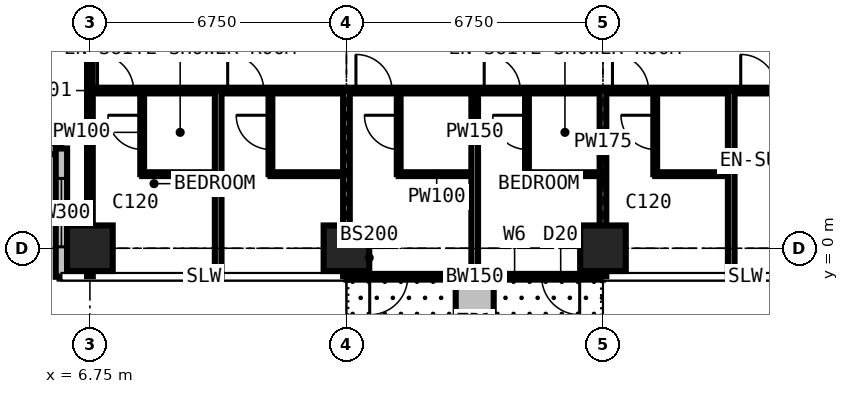
"""IFC4 building model, lengths in metres.
Left out: names, types, materials, properties, quantities, classifications, styles, units other than length and angle.
Written with IfcOpenShell. Run it as: python <this file> out.ifc"""

import sys

from ifc_helpers import new_model, si_unit, direction, frame, frame_2d, origin, origin_2d, place, context, subcontext, project, spatial, rectangle, extrude, element, fill, save


model = new_model("IFC4")
c1 = context("Model", 3, precision=1e-05, world=origin(), true_north=direction((0.0, 1.0)))
c2 = subcontext(c1, "Body", "Model", "MODEL_VIEW")
j1 = project(units=[si_unit("LENGTHUNIT", "METRE"), si_unit("PLANEANGLEUNIT", "RADIAN")], contexts=[c1])
p1 = place(None, origin())
s1 = spatial("IfcSite", under=j1, at=p1, CompositionType="ELEMENT")
p2 = place(p1, origin())
s2 = spatial("IfcBuilding", under=s1, at=p2, CompositionType="ELEMENT")
p3 = place(p2, frame((0.0, 0.0, 171.0)))
s3 = spatial("IfcBuildingStorey", under=s2, at=p3, CompositionType="ELEMENT", Elevation=171.0)
for number, where, z_axis, x_axis in (
    (1, (6.75, 0.0, 0.0), (0.0, 0.0, 1.0), (1.0, 0.0, 0.0)),
    (2, (13.5, 0.0, 0.0), (0.0, 0.0, 1.0), (1.0, 0.0, 0.0)),
    (3, (20.25, 0.0, 0.0), (0.0, 0.0, 1.0), (1.0, 0.0, 0.0)),
):
    element("IfcColumn", number, at=place(p3, frame(where, z_axis=z_axis, x_axis=x_axis)), inside=s3, PredefinedType="COLUMN", context=c2, shape_type="SweptSolid", body=[
        extrude(rectangle(XDim=1.2, YDim=1.2, at=origin_2d()), origin(), (0.0, 0.0, 1.0), 3.6),
    ])
p4 = place(p3, frame((2.625, 2.625, 0.0), z_axis=(0.0, 0.0, 1.0), x_axis=(1.0, 0.0, 0.0)))
e4 = element("IfcWall", 4, at=p4, inside=s3, PredefinedType="SOLIDWALL", context=c2, shape_type="SweptSolid", body=[
    extrude(rectangle(XDim=3.375, YDim=0.3, at=frame_2d((1.688, 0.0))), origin(), (0.0, 0.0, 1.0), 3.375),
])
p5 = place(p4, frame((0.788, 0.0, 0.6)))
e5 = element("IfcOpeningElement", 5, at=p5, cuts=e4, PredefinedType="OPENING", context=c2, shape_type="SweptSolid", body=[
    extrude(rectangle(XDim=1.8, YDim=2.1, at=frame_2d((0.9, 1.05))), frame((0.0, 0.16, 0.0), z_axis=(0.0, -1.0, 0.0), x_axis=(1.0, 0.0, 0.0)), (0.0, 0.0, 1.0), 0.32),
])
p6 = place(p3, frame((6.0, 2.625, 0.0), z_axis=(0.0, 0.0, 1.0), x_axis=(0.0, -1.0, 0.0)))
e6 = element("IfcWall", 6, at=p6, inside=s3, PredefinedType="SOLIDWALL", context=c2, shape_type="SweptSolid", body=[
    extrude(rectangle(XDim=3.375, YDim=0.3, at=frame_2d((1.688, 0.0))), origin(), (0.0, 0.0, 1.0), 3.375),
])
p7 = place(p6, frame((0.788, 0.0, 0.6)))
e7 = element("IfcOpeningElement", 7, at=p7, cuts=e6, PredefinedType="OPENING", context=c2, shape_type="SweptSolid", body=[
    extrude(rectangle(XDim=1.8, YDim=2.1, at=frame_2d((0.9, 1.05))), frame((0.0, 0.16, 0.0), z_axis=(0.0, -1.0, 0.0), x_axis=(1.0, 0.0, 0.0)), (0.0, 0.0, 1.0), 0.32),
])
p8 = place(p3, frame((20.25, -0.75, 0.0), z_axis=(0.0, 0.0, 1.0), x_axis=(-1.0, 0.0, 0.0)))
e8 = element("IfcWall", 8, at=p8, inside=s3, PredefinedType="SOLIDWALL", context=c2, shape_type="SweptSolid", body=[
    extrude(rectangle(XDim=6.75, YDim=0.15, at=frame_2d((3.375, 0.0))), origin(), (0.0, 0.0, 1.0), 3.375),
])
p9 = place(p8, frame((0.613, 0.0, 0.0)))
e9 = element("IfcOpeningElement", 9, at=p9, cuts=e8, PredefinedType="OPENING", context=c2, shape_type="SweptSolid", body=[
    extrude(rectangle(XDim=1.0, YDim=2.2, at=frame_2d((0.5, 1.1))), frame((0.0, 0.085, 0.0), z_axis=(0.0, -1.0, 0.0), x_axis=(1.0, 0.0, 0.0)), (0.0, 0.0, 1.0), 0.17),
])
p10 = place(p8, frame((1.725, 0.0, 0.9)))
e10 = element("IfcOpeningElement", 10, at=p10, cuts=e8, PredefinedType="OPENING", context=c2, shape_type="SweptSolid", body=[
    extrude(rectangle(XDim=1.2, YDim=1.8, at=frame_2d((0.6, 0.9))), frame((0.0, 0.085, 0.0), z_axis=(0.0, -1.0, 0.0), x_axis=(1.0, 0.0, 0.0)), (0.0, 0.0, 1.0), 0.17),
])
p11 = place(p8, frame((5.137, 0.0, 0.0)))
e11 = element("IfcOpeningElement", 11, at=p11, cuts=e8, PredefinedType="OPENING", context=c2, shape_type="SweptSolid", body=[
    extrude(rectangle(XDim=1.0, YDim=2.2, at=frame_2d((0.5, 1.1))), frame((0.0, 0.085, 0.0), z_axis=(0.0, -1.0, 0.0), x_axis=(1.0, 0.0, 0.0)), (0.0, 0.0, 1.0), 0.17),
])
p12 = place(p8, frame((3.825, 0.0, 0.9)))
e12 = element("IfcOpeningElement", 12, at=p12, cuts=e8, PredefinedType="OPENING", context=c2, shape_type="SweptSolid", body=[
    extrude(rectangle(XDim=1.2, YDim=1.8, at=frame_2d((0.6, 0.9))), frame((0.0, 0.085, 0.0), z_axis=(0.0, -1.0, 0.0), x_axis=(1.0, 0.0, 0.0)), (0.0, 0.0, 1.0), 0.17),
])
p13 = place(p3, frame((16.875, -0.85, 0.0), z_axis=(0.0, 0.0, 1.0), x_axis=(0.0, -1.0, 0.0)))
e13 = element("IfcWall", 13, at=p13, inside=s3, PredefinedType="USERDEFINED", context=c2, shape_type="SweptSolid", body=[
    extrude(rectangle(XDim=2.2, YDim=1.0, at=frame_2d((1.1, 0.0))), origin(), (0.0, 0.0, 1.0), 0.9),
])
p14 = place(p3, frame((6.75, -0.734, 0.0), z_axis=(0.0, 0.0, 1.0), x_axis=(0.0, 1.0, 0.0)))
e14 = element("IfcWall", 14, at=p14, inside=s3, PredefinedType="PARTITIONING", context=c2, shape_type="SweptSolid", body=[
    extrude(rectangle(XDim=10.859, YDim=0.15, at=frame_2d((5.429, 0.0))), origin(), (0.0, 0.0, 1.0), 2.877),
])
p15 = place(p14, frame((8.084, 0.0, 0.0)))
e15 = element("IfcOpeningElement", 15, at=p15, cuts=e14, PredefinedType="OPENING", context=c2, shape_type="SweptSolid", body=[
    extrude(rectangle(XDim=1.0, YDim=2.2, at=frame_2d((0.5, 1.1))), frame((0.0, 0.085, 0.0), z_axis=(0.0, -1.0, 0.0), x_axis=(1.0, 0.0, 0.0)), (0.0, 0.0, 1.0), 0.17),
])
p16 = place(p3, frame((6.75, 4.15, 0.0), z_axis=(0.0, 0.0, 1.0), x_axis=(1.0, 0.0, 0.0)))
e16 = element("IfcWall", 16, at=p16, inside=s3, PredefinedType="PARTITIONING", context=c2, shape_type="SweptSolid", body=[
    extrude(rectangle(XDim=20.25, YDim=0.15, at=frame_2d((10.125, 0.0))), origin(), (0.0, 0.0, 1.0), 3.375),
])
p17 = place(p16, frame((0.2, 0.0, 0.0)))
e17 = element("IfcOpeningElement", 17, at=p17, cuts=e16, PredefinedType="OPENING", context=c2, shape_type="SweptSolid", body=[
    extrude(rectangle(XDim=0.95, YDim=2.2, at=frame_2d((0.475, 1.1))), frame((0.0, 0.085, 0.0), z_axis=(0.0, -1.0, 0.0), x_axis=(1.0, 0.0, 0.0)), (0.0, 0.0, 1.0), 0.17),
])
p18 = place(p16, frame((3.625, 0.0, 0.0)))
e18 = element("IfcOpeningElement", 18, at=p18, cuts=e16, PredefinedType="OPENING", context=c2, shape_type="SweptSolid", body=[
    extrude(rectangle(XDim=0.95, YDim=2.2, at=frame_2d((0.475, 1.1))), frame((0.0, 0.085, 0.0), z_axis=(0.0, -1.0, 0.0), x_axis=(1.0, 0.0, 0.0)), (0.0, 0.0, 1.0), 0.17),
])
p19 = place(p16, frame((7.0, 0.0, 0.0)))
e19 = element("IfcOpeningElement", 19, at=p19, cuts=e16, PredefinedType="OPENING", context=c2, shape_type="SweptSolid", body=[
    extrude(rectangle(XDim=0.95, YDim=2.2, at=frame_2d((0.475, 1.1))), frame((0.0, 0.085, 0.0), z_axis=(0.0, -1.0, 0.0), x_axis=(1.0, 0.0, 0.0)), (0.0, 0.0, 1.0), 0.17),
])
p20 = place(p16, frame((10.375, 0.0, 0.0)))
e20 = element("IfcOpeningElement", 20, at=p20, cuts=e16, PredefinedType="OPENING", context=c2, shape_type="SweptSolid", body=[
    extrude(rectangle(XDim=0.95, YDim=2.2, at=frame_2d((0.475, 1.1))), frame((0.0, 0.085, 0.0), z_axis=(0.0, -1.0, 0.0), x_axis=(1.0, 0.0, 0.0)), (0.0, 0.0, 1.0), 0.17),
])
p21 = place(p16, frame((13.75, 0.0, 0.0)))
e21 = element("IfcOpeningElement", 21, at=p21, cuts=e16, PredefinedType="OPENING", context=c2, shape_type="SweptSolid", body=[
    extrude(rectangle(XDim=0.95, YDim=2.2, at=frame_2d((0.475, 1.1))), frame((0.0, 0.085, 0.0), z_axis=(0.0, -1.0, 0.0), x_axis=(1.0, 0.0, 0.0)), (0.0, 0.0, 1.0), 0.17),
])
p22 = place(p16, frame((17.125, 0.0, 0.0)))
e22 = element("IfcOpeningElement", 22, at=p22, cuts=e16, PredefinedType="OPENING", context=c2, shape_type="SweptSolid", body=[
    extrude(rectangle(XDim=0.95, YDim=2.2, at=frame_2d((0.475, 1.1))), frame((0.0, 0.085, 0.0), z_axis=(0.0, -1.0, 0.0), x_axis=(1.0, 0.0, 0.0)), (0.0, 0.0, 1.0), 0.17),
])
p23 = place(p3, frame((8.125, 1.95, 0.0), z_axis=(0.0, 0.0, 1.0), x_axis=(0.0, 1.0, 0.0)))
e23 = element("IfcWall", 23, at=p23, inside=s3, PredefinedType="PARTITIONING", context=c2, shape_type="SweptSolid", body=[
    extrude(rectangle(XDim=2.2, YDim=0.1, at=frame_2d((1.1, 0.0))), origin(), (0.0, 0.0, 1.0), 3.375),
])
p24 = place(p23, frame((0.65, 0.0, 0.0)))
e24 = element("IfcOpeningElement", 24, at=p24, cuts=e23, PredefinedType="OPENING", context=c2, shape_type="SweptSolid", body=[
    extrude(rectangle(XDim=0.9, YDim=2.2, at=frame_2d((0.45, 1.1))), frame((0.0, 0.06, 0.0), z_axis=(0.0, -1.0, 0.0), x_axis=(1.0, 0.0, 0.0)), (0.0, 0.0, 1.0), 0.12),
])
p25 = place(p3, frame((8.125, 1.95, 0.0), z_axis=(0.0, 0.0, 1.0), x_axis=(1.0, 0.0, 0.0)))
e25 = element("IfcWall", 25, at=p25, inside=s3, PredefinedType="PARTITIONING", context=c2, shape_type="SweptSolid", body=[
    extrude(rectangle(XDim=2.0, YDim=0.1, at=frame_2d((1.0, 0.0))), origin(), (0.0, 0.0, 1.0), 3.375),
])
p26 = place(p3, frame((10.125, -0.734, 0.0), z_axis=(0.0, 0.0, 1.0), x_axis=(0.0, 1.0, 0.0)))
e26 = element("IfcWall", 26, at=p26, inside=s3, PredefinedType="PARTITIONING", context=c2, shape_type="SweptSolid", body=[
    extrude(rectangle(XDim=4.884, YDim=0.175, at=frame_2d((2.442, 0.0))), origin(), (0.0, 0.0, 1.0), 3.375),
])
p27 = place(p3, frame((11.5, 1.95, 0.0), z_axis=(0.0, 0.0, 1.0), x_axis=(0.0, 1.0, 0.0)))
e27 = element("IfcWall", 27, at=p27, inside=s3, PredefinedType="PARTITIONING", context=c2, shape_type="SweptSolid", body=[
    extrude(rectangle(XDim=2.2, YDim=0.1, at=frame_2d((1.1, 0.0))), origin(), (0.0, 0.0, 1.0), 3.375),
])
p28 = place(p27, frame((0.65, 0.0, 0.0)))
e28 = element("IfcOpeningElement", 28, at=p28, cuts=e27, PredefinedType="OPENING", context=c2, shape_type="SweptSolid", body=[
    extrude(rectangle(XDim=0.9, YDim=2.2, at=frame_2d((0.45, 1.1))), frame((0.0, 0.06, 0.0), z_axis=(0.0, -1.0, 0.0), x_axis=(1.0, 0.0, 0.0)), (0.0, 0.0, 1.0), 0.12),
])
p29 = place(p3, frame((11.5, 1.95, 0.0), z_axis=(0.0, 0.0, 1.0), x_axis=(1.0, 0.0, 0.0)))
e29 = element("IfcWall", 29, at=p29, inside=s3, PredefinedType="PARTITIONING", context=c2, shape_type="SweptSolid", body=[
    extrude(rectangle(XDim=2.0, YDim=0.1, at=frame_2d((1.0, 0.0))), origin(), (0.0, 0.0, 1.0), 3.375),
])
p30 = place(p3, frame((13.5, -0.734, 0.0), z_axis=(0.0, 0.0, 1.0), x_axis=(0.0, 1.0, 0.0)))
e30 = element("IfcWall", 30, at=p30, inside=s3, PredefinedType="PARTITIONING", context=c2, shape_type="SweptSolid", body=[
    extrude(rectangle(XDim=4.884, YDim=0.175, at=frame_2d((2.442, 0.0))), origin(), (0.0, 0.0, 1.0), 2.877),
])
p31 = place(p3, frame((14.875, 1.95, 0.0), z_axis=(0.0, 0.0, 1.0), x_axis=(0.0, 1.0, 0.0)))
e31 = element("IfcWall", 31, at=p31, inside=s3, PredefinedType="PARTITIONING", context=c2, shape_type="SweptSolid", body=[
    extrude(rectangle(XDim=2.2, YDim=0.1, at=frame_2d((1.1, 0.0))), origin(), (0.0, 0.0, 1.0), 3.375),
])
p32 = place(p31, frame((0.65, 0.0, 0.0)))
e32 = element("IfcOpeningElement", 32, at=p32, cuts=e31, PredefinedType="OPENING", context=c2, shape_type="SweptSolid", body=[
    extrude(rectangle(XDim=0.9, YDim=2.2, at=frame_2d((0.45, 1.1))), frame((0.0, 0.06, 0.0), z_axis=(0.0, -1.0, 0.0), x_axis=(1.0, 0.0, 0.0)), (0.0, 0.0, 1.0), 0.12),
])
p33 = place(p3, frame((14.875, 1.95, 0.0), z_axis=(0.0, 0.0, 1.0), x_axis=(1.0, 0.0, 0.0)))
e33 = element("IfcWall", 33, at=p33, inside=s3, PredefinedType="PARTITIONING", context=c2, shape_type="SweptSolid", body=[
    extrude(rectangle(XDim=2.0, YDim=0.1, at=frame_2d((1.0, 0.0))), origin(), (0.0, 0.0, 1.0), 3.375),
])
p34 = place(p3, frame((16.875, -0.734, 0.0), z_axis=(0.0, 0.0, 1.0), x_axis=(0.0, 1.0, 0.0)))
e34 = element("IfcWall", 34, at=p34, inside=s3, PredefinedType="PARTITIONING", context=c2, shape_type="SweptSolid", body=[
    extrude(rectangle(XDim=4.884, YDim=0.175, at=frame_2d((2.442, 0.0))), origin(), (0.0, 0.0, 1.0), 3.375),
])
p35 = place(p3, frame((18.25, 1.95, 0.0), z_axis=(0.0, 0.0, 1.0), x_axis=(0.0, 1.0, 0.0)))
e35 = element("IfcWall", 35, at=p35, inside=s3, PredefinedType="PARTITIONING", context=c2, shape_type="SweptSolid", body=[
    extrude(rectangle(XDim=2.2, YDim=0.1, at=frame_2d((1.1, 0.0))), origin(), (0.0, 0.0, 1.0), 3.375),
])
p36 = place(p35, frame((0.65, 0.0, 0.0)))
e36 = element("IfcOpeningElement", 36, at=p36, cuts=e35, PredefinedType="OPENING", context=c2, shape_type="SweptSolid", body=[
    extrude(rectangle(XDim=0.9, YDim=2.2, at=frame_2d((0.45, 1.1))), frame((0.0, 0.06, 0.0), z_axis=(0.0, -1.0, 0.0), x_axis=(1.0, 0.0, 0.0)), (0.0, 0.0, 1.0), 0.12),
])
p37 = place(p3, frame((18.25, 1.95, 0.0), z_axis=(0.0, 0.0, 1.0), x_axis=(1.0, 0.0, 0.0)))
e37 = element("IfcWall", 37, at=p37, inside=s3, PredefinedType="PARTITIONING", context=c2, shape_type="SweptSolid", body=[
    extrude(rectangle(XDim=2.0, YDim=0.1, at=frame_2d((1.0, 0.0))), origin(), (0.0, 0.0, 1.0), 3.375),
])
p38 = place(p3, frame((20.25, -0.734, 0.0), z_axis=(0.0, 0.0, 1.0), x_axis=(0.0, 1.0, 0.0)))
e38 = element("IfcWall", 38, at=p38, inside=s3, PredefinedType="PARTITIONING", context=c2, shape_type="SweptSolid", body=[
    extrude(rectangle(XDim=4.884, YDim=0.175, at=frame_2d((2.442, 0.0))), origin(), (0.0, 0.0, 1.0), 2.877),
])
p39 = place(p3, frame((21.625, 1.95, 0.0), z_axis=(0.0, 0.0, 1.0), x_axis=(0.0, 1.0, 0.0)))
e39 = element("IfcWall", 39, at=p39, inside=s3, PredefinedType="PARTITIONING", context=c2, shape_type="SweptSolid", body=[
    extrude(rectangle(XDim=2.2, YDim=0.1, at=frame_2d((1.1, 0.0))), origin(), (0.0, 0.0, 1.0), 3.375),
])
p40 = place(p39, frame((0.65, 0.0, 0.0)))
e40 = element("IfcOpeningElement", 40, at=p40, cuts=e39, PredefinedType="OPENING", context=c2, shape_type="SweptSolid", body=[
    extrude(rectangle(XDim=0.9, YDim=2.2, at=frame_2d((0.45, 1.1))), frame((0.0, 0.06, 0.0), z_axis=(0.0, -1.0, 0.0), x_axis=(1.0, 0.0, 0.0)), (0.0, 0.0, 1.0), 0.12),
])
p41 = place(p3, frame((21.625, 1.95, 0.0), z_axis=(0.0, 0.0, 1.0), x_axis=(1.0, 0.0, 0.0)))
e41 = element("IfcWall", 41, at=p41, inside=s3, PredefinedType="PARTITIONING", context=c2, shape_type="SweptSolid", body=[
    extrude(rectangle(XDim=2.0, YDim=0.1, at=frame_2d((1.0, 0.0))), origin(), (0.0, 0.0, 1.0), 3.375),
])
p42 = place(p3, frame((23.625, -0.734, 0.0), z_axis=(0.0, 0.0, 1.0), x_axis=(0.0, 1.0, 0.0)))
e42 = element("IfcWall", 42, at=p42, inside=s3, PredefinedType="PARTITIONING", context=c2, shape_type="SweptSolid", body=[
    extrude(rectangle(XDim=4.884, YDim=0.175, at=frame_2d((2.442, 0.0))), origin(), (0.0, 0.0, 1.0), 3.375),
])
p43 = place(p7, origin())
e43 = element("IfcWindow", 43, at=p43, inside=s3, PartitioningType="SINGLE_PANEL", PredefinedType="WINDOW", context=c2, shape_type="SweptSolid", body=[
    extrude(rectangle(XDim=1.8, YDim=2.1, at=frame_2d((0.9, 1.05))), frame((0.0, 0.03, 0.0), z_axis=(0.0, -1.0, 0.0), x_axis=(1.0, 0.0, 0.0)), (0.0, 0.0, 1.0), 0.06),
])
fill(e7, e43)
p44 = place(p9, origin())
e44 = element("IfcDoor", 44, at=p44, inside=s3, OperationType="SINGLE_SWING_LEFT", PredefinedType="DOOR", context=c2, shape_type="SweptSolid", body=[
    extrude(rectangle(XDim=1.0, YDim=2.2, at=frame_2d((0.5, 1.1))), frame((0.0, 0.025, 0.0), z_axis=(0.0, -1.0, 0.0), x_axis=(1.0, 0.0, 0.0)), (0.0, 0.0, 1.0), 0.05),
])
fill(e9, e44)
p45 = place(p10, origin())
e45 = element("IfcWindow", 45, at=p45, inside=s3, PartitioningType="SINGLE_PANEL", PredefinedType="WINDOW", context=c2, shape_type="SweptSolid", body=[
    extrude(rectangle(XDim=1.2, YDim=1.8, at=frame_2d((0.6, 0.9))), frame((0.0, 0.03, 0.0), z_axis=(0.0, -1.0, 0.0), x_axis=(1.0, 0.0, 0.0)), (0.0, 0.0, 1.0), 0.06),
])
fill(e10, e45)
p46 = place(p11, origin())
e46 = element("IfcDoor", 46, at=p46, inside=s3, OperationType="SINGLE_SWING_RIGHT", PredefinedType="DOOR", context=c2, shape_type="SweptSolid", body=[
    extrude(rectangle(XDim=1.0, YDim=2.2, at=frame_2d((0.5, 1.1))), frame((0.0, 0.025, 0.0), z_axis=(0.0, -1.0, 0.0), x_axis=(1.0, 0.0, 0.0)), (0.0, 0.0, 1.0), 0.05),
])
fill(e11, e46)
p47 = place(p12, origin())
e47 = element("IfcWindow", 47, at=p47, inside=s3, PartitioningType="SINGLE_PANEL", PredefinedType="WINDOW", context=c2, shape_type="SweptSolid", body=[
    extrude(rectangle(XDim=1.2, YDim=1.8, at=frame_2d((0.6, 0.9))), frame((0.0, 0.03, 0.0), z_axis=(0.0, -1.0, 0.0), x_axis=(1.0, 0.0, 0.0)), (0.0, 0.0, 1.0), 0.06),
])
fill(e12, e47)
p48 = place(p17, origin())
e48 = element("IfcDoor", 48, at=p48, inside=s3, OperationType="SINGLE_SWING_LEFT", PredefinedType="DOOR", context=c2, shape_type="SweptSolid", body=[
    extrude(rectangle(XDim=0.95, YDim=2.2, at=frame_2d((0.475, 1.1))), frame((0.0, 0.025, 0.0), z_axis=(0.0, -1.0, 0.0), x_axis=(1.0, 0.0, 0.0)), (0.0, 0.0, 1.0), 0.05),
])
fill(e17, e48)
p49 = place(p24, origin())
e49 = element("IfcDoor", 49, at=p49, inside=s3, OperationType="SINGLE_SWING_RIGHT", PredefinedType="DOOR", context=c2, shape_type="SweptSolid", body=[
    extrude(rectangle(XDim=0.9, YDim=2.2, at=frame_2d((0.45, 1.1))), frame((0.0, 0.025, 0.0), z_axis=(0.0, -1.0, 0.0), x_axis=(1.0, 0.0, 0.0)), (0.0, 0.0, 1.0), 0.05),
])
fill(e24, e49)
p50 = place(p18, origin())
e50 = element("IfcDoor", 50, at=p50, inside=s3, OperationType="SINGLE_SWING_LEFT", PredefinedType="DOOR", context=c2, shape_type="SweptSolid", body=[
    extrude(rectangle(XDim=0.95, YDim=2.2, at=frame_2d((0.475, 1.1))), frame((0.0, 0.025, 0.0), z_axis=(0.0, -1.0, 0.0), x_axis=(1.0, 0.0, 0.0)), (0.0, 0.0, 1.0), 0.05),
])
fill(e18, e50)
p51 = place(p28, origin())
e51 = element("IfcDoor", 51, at=p51, inside=s3, OperationType="SINGLE_SWING_RIGHT", PredefinedType="DOOR", context=c2, shape_type="SweptSolid", body=[
    extrude(rectangle(XDim=0.9, YDim=2.2, at=frame_2d((0.45, 1.1))), frame((0.0, 0.025, 0.0), z_axis=(0.0, -1.0, 0.0), x_axis=(1.0, 0.0, 0.0)), (0.0, 0.0, 1.0), 0.05),
])
fill(e28, e51)
p52 = place(p19, origin())
e52 = element("IfcDoor", 52, at=p52, inside=s3, OperationType="SINGLE_SWING_LEFT", PredefinedType="DOOR", context=c2, shape_type="SweptSolid", body=[
    extrude(rectangle(XDim=0.95, YDim=2.2, at=frame_2d((0.475, 1.1))), frame((0.0, 0.025, 0.0), z_axis=(0.0, -1.0, 0.0), x_axis=(1.0, 0.0, 0.0)), (0.0, 0.0, 1.0), 0.05),
])
fill(e19, e52)
p53 = place(p32, origin())
e53 = element("IfcDoor", 53, at=p53, inside=s3, OperationType="SINGLE_SWING_RIGHT", PredefinedType="DOOR", context=c2, shape_type="SweptSolid", body=[
    extrude(rectangle(XDim=0.9, YDim=2.2, at=frame_2d((0.45, 1.1))), frame((0.0, 0.025, 0.0), z_axis=(0.0, -1.0, 0.0), x_axis=(1.0, 0.0, 0.0)), (0.0, 0.0, 1.0), 0.05),
])
fill(e32, e53)
p54 = place(p20, origin())
e54 = element("IfcDoor", 54, at=p54, inside=s3, OperationType="SINGLE_SWING_LEFT", PredefinedType="DOOR", context=c2, shape_type="SweptSolid", body=[
    extrude(rectangle(XDim=0.95, YDim=2.2, at=frame_2d((0.475, 1.1))), frame((0.0, 0.025, 0.0), z_axis=(0.0, -1.0, 0.0), x_axis=(1.0, 0.0, 0.0)), (0.0, 0.0, 1.0), 0.05),
])
fill(e20, e54)
p55 = place(p36, origin())
e55 = element("IfcDoor", 55, at=p55, inside=s3, OperationType="SINGLE_SWING_RIGHT", PredefinedType="DOOR", context=c2, shape_type="SweptSolid", body=[
    extrude(rectangle(XDim=0.9, YDim=2.2, at=frame_2d((0.45, 1.1))), frame((0.0, 0.025, 0.0), z_axis=(0.0, -1.0, 0.0), x_axis=(1.0, 0.0, 0.0)), (0.0, 0.0, 1.0), 0.05),
])
fill(e36, e55)
p56 = place(p21, origin())
e56 = element("IfcDoor", 56, at=p56, inside=s3, OperationType="SINGLE_SWING_LEFT", PredefinedType="DOOR", context=c2, shape_type="SweptSolid", body=[
    extrude(rectangle(XDim=0.95, YDim=2.2, at=frame_2d((0.475, 1.1))), frame((0.0, 0.025, 0.0), z_axis=(0.0, -1.0, 0.0), x_axis=(1.0, 0.0, 0.0)), (0.0, 0.0, 1.0), 0.05),
])
fill(e21, e56)
p57 = place(p40, origin())
e57 = element("IfcDoor", 57, at=p57, inside=s3, OperationType="SINGLE_SWING_RIGHT", PredefinedType="DOOR", context=c2, shape_type="SweptSolid", body=[
    extrude(rectangle(XDim=0.9, YDim=2.2, at=frame_2d((0.45, 1.1))), frame((0.0, 0.025, 0.0), z_axis=(0.0, -1.0, 0.0), x_axis=(1.0, 0.0, 0.0)), (0.0, 0.0, 1.0), 0.05),
])
fill(e40, e57)
p58 = place(p22, origin())
e58 = element("IfcDoor", 58, at=p58, inside=s3, OperationType="SINGLE_SWING_LEFT", PredefinedType="DOOR", context=c2, shape_type="SweptSolid", body=[
    extrude(rectangle(XDim=0.95, YDim=2.2, at=frame_2d((0.475, 1.1))), frame((0.0, 0.025, 0.0), z_axis=(0.0, -1.0, 0.0), x_axis=(1.0, 0.0, 0.0)), (0.0, 0.0, 1.0), 0.05),
])
fill(e22, e58)
save(model, sys.argv[1])
